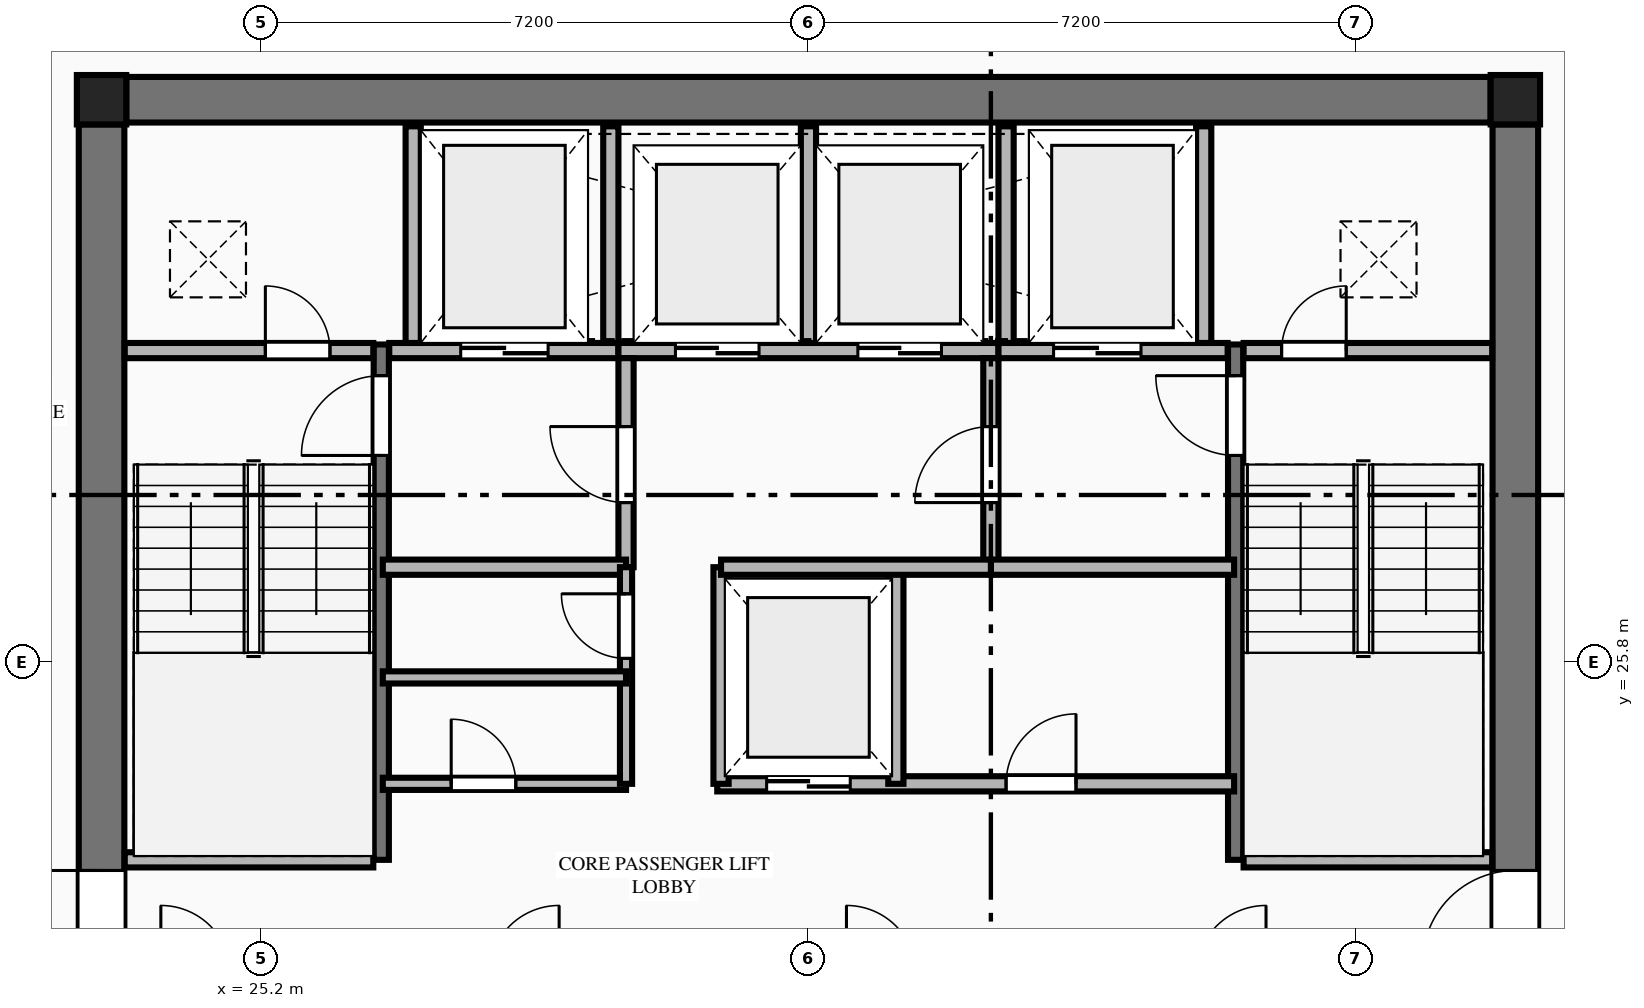
"""IFC4 building model, lengths in metres.
Left out: names, types, materials, properties, quantities, classifications, styles, units other than length and angle.
Written with IfcOpenShell. Run it as: python <this file> out.ifc"""

import sys

from ifc_helpers import new_model, si_unit, direction, frame, frame_2d, origin, origin_2d, place, context, subcontext, project, spatial, rectangle, extrude, element, fill, save


model = new_model("IFC4")
c1 = context("Model", 3, precision=1e-05, world=origin(), true_north=direction((0.0, 1.0)))
c2 = subcontext(c1, "Body", "Model", "MODEL_VIEW")
j1 = project(units=[si_unit("LENGTHUNIT", "METRE"), si_unit("PLANEANGLEUNIT", "RADIAN")], contexts=[c1])
p1 = place(None, origin())
s1 = spatial("IfcSite", under=j1, at=p1, CompositionType="ELEMENT")
p2 = place(p1, origin())
s2 = spatial("IfcBuilding", under=s1, at=p2, CompositionType="ELEMENT")
p3 = place(p2, frame((0.0, 0.0, 210.95)))
s3 = spatial("IfcBuildingStorey", under=s2, at=p3, CompositionType="ELEMENT", Elevation=210.95)
for number, where, z_axis, x_axis in (
    (1, (41.7, 33.2, 0.0), (0.0, 0.0, 1.0), (1.0, 0.0, 0.0)),
    (2, (23.1, 33.2, 0.0), (0.0, 0.0, 1.0), (1.0, 0.0, 0.0)),
):
    element("IfcColumn", number, at=place(p3, frame(where, z_axis=z_axis, x_axis=x_axis)), inside=s3, PredefinedType="COLUMN", context=c2, shape_type="SweptSolid", body=[
        extrude(rectangle(XDim=0.65, YDim=0.65, at=origin_2d()), origin(), (0.0, 0.0, 1.0), 3.55),
    ])
p4 = place(p3, frame((23.425, 33.2, 0.0), z_axis=(0.0, 0.0, 1.0), x_axis=(1.0, 0.0, 0.0)))
e3 = element("IfcWall", 3, at=p4, inside=s3, PredefinedType="SHEAR", context=c2, shape_type="SweptSolid", body=[
    extrude(rectangle(XDim=17.95, YDim=0.6, at=frame_2d((8.975, 0.0))), origin(), (0.0, 0.0, 1.0), 3.35),
])
p5 = place(p3, frame((23.1, 18.925, 0.0), z_axis=(0.0, 0.0, 1.0), x_axis=(0.0, 1.0, 0.0)))
e4 = element("IfcWall", 4, at=p5, inside=s3, PredefinedType="SHEAR", context=c2, shape_type="SweptSolid", body=[
    extrude(rectangle(XDim=13.95, YDim=0.6, at=frame_2d((6.975, 0.0))), origin(), (0.0, 0.0, 1.0), 3.35),
])
p6 = place(p5, frame((2.915, 0.0, 0.0)))
e5 = element("IfcOpeningElement", 5, at=p6, cuts=e4, PredefinedType="OPENING", context=c2, shape_type="SweptSolid", body=[
    extrude(rectangle(XDim=1.22, YDim=2.25, at=frame_2d((0.61, 1.125))), frame((0.0, 0.31, 0.0), z_axis=(0.0, -1.0, 0.0), x_axis=(1.0, 0.0, 0.0)), (0.0, 0.0, 1.0), 0.62),
])
p7 = place(p3, frame((41.7, 18.925, 0.0), z_axis=(0.0, 0.0, 1.0), x_axis=(0.0, 1.0, 0.0)))
e6 = element("IfcWall", 6, at=p7, inside=s3, PredefinedType="SHEAR", context=c2, shape_type="SweptSolid", body=[
    extrude(rectangle(XDim=13.95, YDim=0.6, at=frame_2d((6.975, 0.0))), origin(), (0.0, 0.0, 1.0), 3.35),
])
p8 = place(p7, frame((2.915, 0.0, 0.0)))
e7 = element("IfcOpeningElement", 7, at=p8, cuts=e6, PredefinedType="OPENING", context=c2, shape_type="SweptSolid", body=[
    extrude(rectangle(XDim=1.22, YDim=2.25, at=frame_2d((0.61, 1.125))), frame((0.0, 0.31, 0.0), z_axis=(0.0, -1.0, 0.0), x_axis=(1.0, 0.0, 0.0)), (0.0, 0.0, 1.0), 0.62),
])
p9 = place(p3, frame((26.78, 23.2, 0.0), z_axis=(0.0, 0.0, 1.0), x_axis=(0.0, 1.0, 0.0)))
e8 = element("IfcWall", 8, at=p9, inside=s3, PredefinedType="SHEAR", context=c2, shape_type="SweptSolid", body=[
    extrude(rectangle(XDim=6.78, YDim=0.2, at=frame_2d((3.39, 0.0))), origin(), (0.0, 0.0, 1.0), 3.55),
])
p10 = place(p9, frame((5.32, 0.0, 0.0)))
e9 = element("IfcOpeningElement", 9, at=p10, cuts=e8, PredefinedType="OPENING", context=c2, shape_type="SweptSolid", body=[
    extrude(rectangle(XDim=1.05, YDim=2.15, at=frame_2d((0.525, 1.075))), frame((0.0, 0.11, 0.0), z_axis=(0.0, -1.0, 0.0), x_axis=(1.0, 0.0, 0.0)), (0.0, 0.0, 1.0), 0.22),
])
p11 = place(p3, frame((23.405, 23.2, 0.0), z_axis=(0.0, 0.0, 1.0), x_axis=(1.0, 0.0, 0.0)))
e10 = element("IfcWall", 10, at=p11, inside=s3, PredefinedType="PLUMBINGWALL", context=c2, shape_type="SweptSolid", body=[
    extrude(rectangle(XDim=3.27, YDim=0.2, at=frame_2d((1.635, 0.0))), origin(), (0.0, 0.0, 1.0), 3.35),
])
p12 = place(p3, frame((38.02, 23.2, 0.0), z_axis=(0.0, 0.0, 1.0), x_axis=(0.0, 1.0, 0.0)))
e11 = element("IfcWall", 11, at=p12, inside=s3, PredefinedType="SHEAR", context=c2, shape_type="SweptSolid", body=[
    extrude(rectangle(XDim=6.78, YDim=0.2, at=frame_2d((3.39, 0.0))), origin(), (0.0, 0.0, 1.0), 3.55),
])
p13 = place(p12, frame((5.32, 0.0, 0.0)))
e12 = element("IfcOpeningElement", 12, at=p13, cuts=e11, PredefinedType="OPENING", context=c2, shape_type="SweptSolid", body=[
    extrude(rectangle(XDim=1.05, YDim=2.15, at=frame_2d((0.525, 1.075))), frame((0.0, 0.11, 0.0), z_axis=(0.0, -1.0, 0.0), x_axis=(1.0, 0.0, 0.0)), (0.0, 0.0, 1.0), 0.22),
])
p14 = place(p3, frame((38.125, 23.2, 0.0), z_axis=(0.0, 0.0, 1.0), x_axis=(1.0, 0.0, 0.0)))
e13 = element("IfcWall", 13, at=p14, inside=s3, PredefinedType="PLUMBINGWALL", context=c2, shape_type="SweptSolid", body=[
    extrude(rectangle(XDim=3.27, YDim=0.2, at=frame_2d((1.635, 0.0))), origin(), (0.0, 0.0, 1.0), 3.35),
])
p15 = place(p3, frame((23.405, 29.9, 0.0), z_axis=(0.0, 0.0, 1.0), x_axis=(1.0, 0.0, 0.0)))
e14 = element("IfcWall", 14, at=p15, inside=s3, PredefinedType="PLUMBINGWALL", context=c2, shape_type="SweptSolid", body=[
    extrude(rectangle(XDim=3.27, YDim=0.2, at=frame_2d((1.635, 0.0))), origin(), (0.0, 0.0, 1.0), 3.35),
])
p16 = place(p15, frame((1.85, 0.0, 0.0)))
e15 = element("IfcOpeningElement", 15, at=p16, cuts=e14, PredefinedType="OPENING", context=c2, shape_type="SweptSolid", body=[
    extrude(rectangle(XDim=0.85, YDim=2.05, at=frame_2d((0.425, 1.025))), frame((0.0, 0.11, 0.0), z_axis=(0.0, -1.0, 0.0), x_axis=(1.0, 0.0, 0.0)), (0.0, 0.0, 1.0), 0.22),
])
p17 = place(p3, frame((26.885, 29.9, 0.0), z_axis=(0.0, 0.0, 1.0), x_axis=(1.0, 0.0, 0.0)))
e16 = element("IfcWall", 16, at=p17, inside=s3, PredefinedType="PLUMBINGWALL", context=c2, shape_type="SweptSolid", body=[
    extrude(rectangle(XDim=3.015, YDim=0.2, at=frame_2d((1.507, 0.0))), origin(), (0.0, 0.0, 1.0), 3.35),
])
p18 = place(p17, frame((0.94, 0.0, 0.0)))
e17 = element("IfcOpeningElement", 17, at=p18, cuts=e16, PredefinedType="OPENING", context=c2, shape_type="SweptSolid", body=[
    extrude(rectangle(XDim=1.15, YDim=2.2, at=frame_2d((0.575, 1.1))), frame((0.0, 0.11, 0.0), z_axis=(0.0, -1.0, 0.0), x_axis=(1.0, 0.0, 0.0)), (0.0, 0.0, 1.0), 0.22),
])
p19 = place(p3, frame((29.9, 29.9, 0.0), z_axis=(0.0, 0.0, 1.0), x_axis=(1.0, 0.0, 0.0)))
e18 = element("IfcWall", 18, at=p19, inside=s3, PredefinedType="PLUMBINGWALL", context=c2, shape_type="SweptSolid", body=[
    extrude(rectangle(XDim=5.0, YDim=0.2, at=frame_2d((2.5, 0.0))), origin(), (0.0, 0.0, 1.0), 3.35),
])
p20 = place(p19, frame((0.75, 0.0, 0.0)))
e19 = element("IfcOpeningElement", 19, at=p20, cuts=e18, PredefinedType="OPENING", context=c2, shape_type="SweptSolid", body=[
    extrude(rectangle(XDim=1.1, YDim=2.2, at=frame_2d((0.55, 1.1))), frame((0.0, 0.11, 0.0), z_axis=(0.0, -1.0, 0.0), x_axis=(1.0, 0.0, 0.0)), (0.0, 0.0, 1.0), 0.22),
])
p21 = place(p19, frame((3.15, 0.0, 0.0)))
e20 = element("IfcOpeningElement", 20, at=p21, cuts=e18, PredefinedType="OPENING", context=c2, shape_type="SweptSolid", body=[
    extrude(rectangle(XDim=1.1, YDim=2.2, at=frame_2d((0.55, 1.1))), frame((0.0, 0.11, 0.0), z_axis=(0.0, -1.0, 0.0), x_axis=(1.0, 0.0, 0.0)), (0.0, 0.0, 1.0), 0.22),
])
p22 = place(p3, frame((34.9, 29.9, 0.0), z_axis=(0.0, 0.0, 1.0), x_axis=(1.0, 0.0, 0.0)))
e21 = element("IfcWall", 21, at=p22, inside=s3, PredefinedType="PLUMBINGWALL", context=c2, shape_type="SweptSolid", body=[
    extrude(rectangle(XDim=3.015, YDim=0.2, at=frame_2d((1.508, 0.0))), origin(), (0.0, 0.0, 1.0), 3.35),
])
p23 = place(p22, frame((0.725, 0.0, 0.0)))
e22 = element("IfcOpeningElement", 22, at=p23, cuts=e21, PredefinedType="OPENING", context=c2, shape_type="SweptSolid", body=[
    extrude(rectangle(XDim=1.15, YDim=2.2, at=frame_2d((0.575, 1.1))), frame((0.0, 0.11, 0.0), z_axis=(0.0, -1.0, 0.0), x_axis=(1.0, 0.0, 0.0)), (0.0, 0.0, 1.0), 0.22),
])
p24 = place(p3, frame((38.125, 29.9, 0.0), z_axis=(0.0, 0.0, 1.0), x_axis=(1.0, 0.0, 0.0)))
e23 = element("IfcWall", 23, at=p24, inside=s3, PredefinedType="PLUMBINGWALL", context=c2, shape_type="SweptSolid", body=[
    extrude(rectangle(XDim=3.27, YDim=0.2, at=frame_2d((1.635, 0.0))), origin(), (0.0, 0.0, 1.0), 3.35),
])
p25 = place(p24, frame((0.5, 0.0, 0.0)))
e24 = element("IfcOpeningElement", 24, at=p25, cuts=e23, PredefinedType="OPENING", context=c2, shape_type="SweptSolid", body=[
    extrude(rectangle(XDim=0.85, YDim=2.05, at=frame_2d((0.425, 1.025))), frame((0.0, 0.11, 0.0), z_axis=(0.0, -1.0, 0.0), x_axis=(1.0, 0.0, 0.0)), (0.0, 0.0, 1.0), 0.22),
])
for number, where, z_axis, x_axis in (
    (25, (27.2, 30.0, 0.0), (0.0, 0.0, 1.0), (0.0, 1.0, 0.0)),
    (26, (29.8, 30.0, 0.0), (0.0, 0.0, 1.0), (0.0, 1.0, 0.0)),
    (27, (32.4, 30.0, 0.0), (0.0, 0.0, 1.0), (0.0, 1.0, 0.0)),
    (28, (35.0, 30.0, 0.0), (0.0, 0.0, 1.0), (0.0, 1.0, 0.0)),
    (29, (37.6, 30.0, 0.0), (0.0, 0.0, 1.0), (0.0, 1.0, 0.0)),
):
    element("IfcWall", number, at=place(p3, frame(where, z_axis=z_axis, x_axis=x_axis)), inside=s3, PredefinedType="PLUMBINGWALL", context=c2, shape_type="SweptSolid", body=[
        extrude(rectangle(XDim=2.85, YDim=0.2, at=frame_2d((1.425, 0.0))), origin(), (0.0, 0.0, 1.0), 3.35),
    ])
p26 = place(p3, frame((30.0, 27.05, 0.0), z_axis=(0.0, 0.0, 1.0), x_axis=(0.0, 1.0, 0.0)))
e30 = element("IfcWall", 30, at=p26, inside=s3, PredefinedType="PLUMBINGWALL", context=c2, shape_type="SweptSolid", body=[
    extrude(rectangle(XDim=2.75, YDim=0.2, at=frame_2d((1.375, 0.0))), origin(), (0.0, 0.0, 1.0), 3.35),
])
p27 = place(p26, frame((0.85, 0.0, 0.0)))
e31 = element("IfcOpeningElement", 31, at=p27, cuts=e30, PredefinedType="OPENING", context=c2, shape_type="SweptSolid", body=[
    extrude(rectangle(XDim=1.0, YDim=2.15, at=frame_2d((0.5, 1.075))), frame((0.0, 0.11, 0.0), z_axis=(0.0, -1.0, 0.0), x_axis=(1.0, 0.0, 0.0)), (0.0, 0.0, 1.0), 0.22),
])
p28 = place(p3, frame((26.8, 27.05, 0.0), z_axis=(0.0, 0.0, 1.0), x_axis=(1.0, 0.0, 0.0)))
e32 = element("IfcWall", 32, at=p28, inside=s3, PredefinedType="PLUMBINGWALL", context=c2, shape_type="SweptSolid", body=[
    extrude(rectangle(XDim=3.2, YDim=0.2, at=frame_2d((1.6, 0.0))), origin(), (0.0, 0.0, 1.0), 3.35),
])
p29 = place(p3, frame((34.8, 27.05, 0.0), z_axis=(0.0, 0.0, 1.0), x_axis=(0.0, 1.0, 0.0)))
e33 = element("IfcWall", 33, at=p29, inside=s3, PredefinedType="PLUMBINGWALL", context=c2, shape_type="SweptSolid", body=[
    extrude(rectangle(XDim=2.75, YDim=0.2, at=frame_2d((1.375, 0.0))), origin(), (0.0, 0.0, 1.0), 3.35),
])
p30 = place(p29, frame((0.85, 0.0, 0.0)))
e34 = element("IfcOpeningElement", 34, at=p30, cuts=e33, PredefinedType="OPENING", context=c2, shape_type="SweptSolid", body=[
    extrude(rectangle(XDim=1.0, YDim=2.15, at=frame_2d((0.5, 1.075))), frame((0.0, 0.11, 0.0), z_axis=(0.0, -1.0, 0.0), x_axis=(1.0, 0.0, 0.0)), (0.0, 0.0, 1.0), 0.22),
])
p31 = place(p3, frame((34.8, 27.05, 0.0), z_axis=(0.0, 0.0, 1.0), x_axis=(1.0, 0.0, 0.0)))
e35 = element("IfcWall", 35, at=p31, inside=s3, PredefinedType="PLUMBINGWALL", context=c2, shape_type="SweptSolid", body=[
    extrude(rectangle(XDim=3.2, YDim=0.2, at=frame_2d((1.6, 0.0))), origin(), (0.0, 0.0, 1.0), 3.35),
])
p32 = place(p3, frame((26.8, 24.2, 0.0), z_axis=(0.0, 0.0, 1.0), x_axis=(1.0, 0.0, 0.0)))
e36 = element("IfcWall", 36, at=p32, inside=s3, PredefinedType="PARTITIONING", context=c2, shape_type="SweptSolid", body=[
    extrude(rectangle(XDim=3.2, YDim=0.16, at=frame_2d((1.6, 0.0))), origin(), (0.0, 0.0, 1.0), 3.35),
])
p33 = place(p32, frame((0.9, 0.0, 0.0)))
e37 = element("IfcOpeningElement", 37, at=p33, cuts=e36, PredefinedType="OPENING", context=c2, shape_type="SweptSolid", body=[
    extrude(rectangle(XDim=0.85, YDim=2.05, at=frame_2d((0.425, 1.025))), frame((0.0, 0.09, 0.0), z_axis=(0.0, -1.0, 0.0), x_axis=(1.0, 0.0, 0.0)), (0.0, 0.0, 1.0), 0.18),
])
p34 = place(p3, frame((30.0, 24.2, 0.0), z_axis=(0.0, 0.0, 1.0), x_axis=(0.0, 1.0, 0.0)))
e38 = element("IfcWall", 38, at=p34, inside=s3, PredefinedType="PARTITIONING", context=c2, shape_type="SweptSolid", body=[
    extrude(rectangle(XDim=2.85, YDim=0.16, at=frame_2d((1.425, 0.0))), origin(), (0.0, 0.0, 1.0), 3.35),
])
p35 = place(p34, frame((1.65, 0.0, 0.0)))
e39 = element("IfcOpeningElement", 39, at=p35, cuts=e38, PredefinedType="OPENING", context=c2, shape_type="SweptSolid", body=[
    extrude(rectangle(XDim=0.85, YDim=2.05, at=frame_2d((0.425, 1.025))), frame((0.0, 0.09, 0.0), z_axis=(0.0, -1.0, 0.0), x_axis=(1.0, 0.0, 0.0)), (0.0, 0.0, 1.0), 0.18),
])
p36 = place(p3, frame((31.2, 24.2, 0.0), z_axis=(0.0, 0.0, 1.0), x_axis=(1.0, 0.0, 0.0)))
e40 = element("IfcWall", 40, at=p36, inside=s3, PredefinedType="PLUMBINGWALL", context=c2, shape_type="SweptSolid", body=[
    extrude(rectangle(XDim=6.8, YDim=0.2, at=frame_2d((3.4, 0.0))), origin(), (0.0, 0.0, 1.0), 3.35),
])
p37 = place(p36, frame((0.65, 0.0, 0.0)))
e41 = element("IfcOpeningElement", 41, at=p37, cuts=e40, PredefinedType="OPENING", context=c2, shape_type="SweptSolid", body=[
    extrude(rectangle(XDim=1.1, YDim=2.2, at=frame_2d((0.55, 1.1))), frame((0.0, 0.11, 0.0), z_axis=(0.0, -1.0, 0.0), x_axis=(1.0, 0.0, 0.0)), (0.0, 0.0, 1.0), 0.22),
])
p38 = place(p36, frame((3.8, 0.0, 0.0)))
e42 = element("IfcOpeningElement", 42, at=p38, cuts=e40, PredefinedType="OPENING", context=c2, shape_type="SweptSolid", body=[
    extrude(rectangle(XDim=0.92, YDim=2.15, at=frame_2d((0.46, 1.075))), frame((0.0, 0.11, 0.0), z_axis=(0.0, -1.0, 0.0), x_axis=(1.0, 0.0, 0.0)), (0.0, 0.0, 1.0), 0.22),
])
for number, where, z_axis, x_axis in (
    (43, (31.25, 24.2, 0.0), (0.0, 0.0, 1.0), (0.0, 1.0, 0.0)),
    (44, (33.55, 24.2, 0.0), (0.0, 0.0, 1.0), (0.0, 1.0, 0.0)),
):
    element("IfcWall", number, at=place(p3, frame(where, z_axis=z_axis, x_axis=x_axis)), inside=s3, PredefinedType="PLUMBINGWALL", context=c2, shape_type="SweptSolid", body=[
        extrude(rectangle(XDim=2.85, YDim=0.2, at=frame_2d((1.425, 0.0))), origin(), (0.0, 0.0, 1.0), 3.35),
    ])
p39 = place(p3, frame((31.25, 27.05, 0.0), z_axis=(0.0, 0.0, 1.0), x_axis=(1.0, 0.0, 0.0)))
e45 = element("IfcWall", 45, at=p39, inside=s3, PredefinedType="PLUMBINGWALL", context=c2, shape_type="SweptSolid", body=[
    extrude(rectangle(XDim=3.55, YDim=0.2, at=frame_2d((1.775, 0.0))), origin(), (0.0, 0.0, 1.0), 3.35),
])
p40 = place(p3, frame((26.8, 25.6, 0.0), z_axis=(0.0, 0.0, 1.0), x_axis=(1.0, 0.0, 0.0)))
e46 = element("IfcWall", 46, at=p40, inside=s3, PredefinedType="PARTITIONING", context=c2, shape_type="SweptSolid", body=[
    extrude(rectangle(XDim=3.2, YDim=0.16, at=frame_2d((1.6, 0.0))), origin(), (0.0, 0.0, 1.0), 3.35),
])
p41 = place(p6, origin())
e47 = element("IfcDoor", 47, at=p41, inside=s3, OperationType="SINGLE_SWING_RIGHT", PredefinedType="DOOR", context=c2, shape_type="SweptSolid", body=[
    extrude(rectangle(XDim=1.22, YDim=2.25, at=frame_2d((0.61, 1.125))), frame((0.0, 0.025, 0.0), z_axis=(0.0, -1.0, 0.0), x_axis=(1.0, 0.0, 0.0)), (0.0, 0.0, 1.0), 0.05),
])
fill(e5, e47)
p42 = place(p8, origin())
e48 = element("IfcDoor", 48, at=p42, inside=s3, OperationType="SINGLE_SWING_LEFT", PredefinedType="DOOR", context=c2, shape_type="SweptSolid", body=[
    extrude(rectangle(XDim=1.22, YDim=2.25, at=frame_2d((0.61, 1.125))), frame((0.0, 0.025, 0.0), z_axis=(0.0, -1.0, 0.0), x_axis=(1.0, 0.0, 0.0)), (0.0, 0.0, 1.0), 0.05),
])
fill(e7, e48)
p43 = place(p10, origin())
e49 = element("IfcDoor", 49, at=p43, inside=s3, OperationType="SINGLE_SWING_LEFT", PredefinedType="DOOR", context=c2, shape_type="SweptSolid", body=[
    extrude(rectangle(XDim=1.05, YDim=2.15, at=frame_2d((0.525, 1.075))), frame((0.0, 0.025, 0.0), z_axis=(0.0, -1.0, 0.0), x_axis=(1.0, 0.0, 0.0)), (0.0, 0.0, 1.0), 0.05),
])
fill(e9, e49)
p44 = place(p13, origin())
e50 = element("IfcDoor", 50, at=p44, inside=s3, OperationType="SINGLE_SWING_RIGHT", PredefinedType="DOOR", context=c2, shape_type="SweptSolid", body=[
    extrude(rectangle(XDim=1.05, YDim=2.15, at=frame_2d((0.525, 1.075))), frame((0.0, 0.025, 0.0), z_axis=(0.0, -1.0, 0.0), x_axis=(1.0, 0.0, 0.0)), (0.0, 0.0, 1.0), 0.05),
])
fill(e12, e50)
p45 = place(p16, origin())
e51 = element("IfcDoor", 51, at=p45, inside=s3, OperationType="SINGLE_SWING_LEFT", PredefinedType="DOOR", context=c2, shape_type="SweptSolid", body=[
    extrude(rectangle(XDim=0.85, YDim=2.05, at=frame_2d((0.425, 1.025))), frame((0.0, 0.025, 0.0), z_axis=(0.0, -1.0, 0.0), x_axis=(1.0, 0.0, 0.0)), (0.0, 0.0, 1.0), 0.05),
])
fill(e15, e51)
p46 = place(p25, origin())
e52 = element("IfcDoor", 52, at=p46, inside=s3, OperationType="SINGLE_SWING_RIGHT", PredefinedType="DOOR", context=c2, shape_type="SweptSolid", body=[
    extrude(rectangle(XDim=0.85, YDim=2.05, at=frame_2d((0.425, 1.025))), frame((0.0, 0.025, 0.0), z_axis=(0.0, -1.0, 0.0), x_axis=(1.0, 0.0, 0.0)), (0.0, 0.0, 1.0), 0.05),
])
fill(e24, e52)
p47 = place(p18, origin())
e53 = element("IfcDoor", 53, at=p47, inside=s3, OperationType="DOUBLE_DOOR_SLIDING", PredefinedType="DOOR", context=c2, shape_type="SweptSolid", body=[
    extrude(rectangle(XDim=1.15, YDim=2.2, at=frame_2d((0.575, 1.1))), frame((0.0, 0.025, 0.0), z_axis=(0.0, -1.0, 0.0), x_axis=(1.0, 0.0, 0.0)), (0.0, 0.0, 1.0), 0.05),
])
fill(e17, e53)
p48 = place(p23, origin())
e54 = element("IfcDoor", 54, at=p48, inside=s3, OperationType="DOUBLE_DOOR_SLIDING", PredefinedType="DOOR", context=c2, shape_type="SweptSolid", body=[
    extrude(rectangle(XDim=1.15, YDim=2.2, at=frame_2d((0.575, 1.1))), frame((0.0, 0.025, 0.0), z_axis=(0.0, -1.0, 0.0), x_axis=(1.0, 0.0, 0.0)), (0.0, 0.0, 1.0), 0.05),
])
fill(e22, e54)
p49 = place(p20, origin())
e55 = element("IfcDoor", 55, at=p49, inside=s3, OperationType="DOUBLE_DOOR_SLIDING", PredefinedType="DOOR", context=c2, shape_type="SweptSolid", body=[
    extrude(rectangle(XDim=1.1, YDim=2.2, at=frame_2d((0.55, 1.1))), frame((0.0, 0.025, 0.0), z_axis=(0.0, -1.0, 0.0), x_axis=(1.0, 0.0, 0.0)), (0.0, 0.0, 1.0), 0.05),
])
fill(e19, e55)
p50 = place(p21, origin())
e56 = element("IfcDoor", 56, at=p50, inside=s3, OperationType="DOUBLE_DOOR_SLIDING", PredefinedType="DOOR", context=c2, shape_type="SweptSolid", body=[
    extrude(rectangle(XDim=1.1, YDim=2.2, at=frame_2d((0.55, 1.1))), frame((0.0, 0.025, 0.0), z_axis=(0.0, -1.0, 0.0), x_axis=(1.0, 0.0, 0.0)), (0.0, 0.0, 1.0), 0.05),
])
fill(e20, e56)
p51 = place(p27, origin())
e57 = element("IfcDoor", 57, at=p51, inside=s3, OperationType="SINGLE_SWING_RIGHT", PredefinedType="DOOR", context=c2, shape_type="SweptSolid", body=[
    extrude(rectangle(XDim=1.0, YDim=2.15, at=frame_2d((0.5, 1.075))), frame((0.0, 0.025, 0.0), z_axis=(0.0, -1.0, 0.0), x_axis=(1.0, 0.0, 0.0)), (0.0, 0.0, 1.0), 0.05),
])
fill(e31, e57)
p52 = place(p30, origin())
e58 = element("IfcDoor", 58, at=p52, inside=s3, OperationType="SINGLE_SWING_LEFT", PredefinedType="DOOR", context=c2, shape_type="SweptSolid", body=[
    extrude(rectangle(XDim=1.0, YDim=2.15, at=frame_2d((0.5, 1.075))), frame((0.0, 0.025, 0.0), z_axis=(0.0, -1.0, 0.0), x_axis=(1.0, 0.0, 0.0)), (0.0, 0.0, 1.0), 0.05),
])
fill(e34, e58)
p53 = place(p37, origin())
e59 = element("IfcDoor", 59, at=p53, inside=s3, OperationType="DOUBLE_DOOR_SLIDING", PredefinedType="DOOR", context=c2, shape_type="SweptSolid", body=[
    extrude(rectangle(XDim=1.1, YDim=2.2, at=frame_2d((0.55, 1.1))), frame((0.0, 0.025, 0.0), z_axis=(0.0, -1.0, 0.0), x_axis=(1.0, 0.0, 0.0)), (0.0, 0.0, 1.0), 0.05),
])
fill(e41, e59)
p54 = place(p33, origin())
e60 = element("IfcDoor", 60, at=p54, inside=s3, OperationType="SINGLE_SWING_LEFT", PredefinedType="DOOR", context=c2, shape_type="SweptSolid", body=[
    extrude(rectangle(XDim=0.85, YDim=2.05, at=frame_2d((0.425, 1.025))), frame((0.0, 0.025, 0.0), z_axis=(0.0, -1.0, 0.0), x_axis=(1.0, 0.0, 0.0)), (0.0, 0.0, 1.0), 0.05),
])
fill(e37, e60)
p55 = place(p35, origin())
e61 = element("IfcDoor", 61, at=p55, inside=s3, OperationType="SINGLE_SWING_RIGHT", PredefinedType="DOOR", context=c2, shape_type="SweptSolid", body=[
    extrude(rectangle(XDim=0.85, YDim=2.05, at=frame_2d((0.425, 1.025))), frame((0.0, 0.025, 0.0), z_axis=(0.0, -1.0, 0.0), x_axis=(1.0, 0.0, 0.0)), (0.0, 0.0, 1.0), 0.05),
])
fill(e39, e61)
p56 = place(p38, origin())
e62 = element("IfcDoor", 62, at=p56, inside=s3, OperationType="SINGLE_SWING_RIGHT", PredefinedType="DOOR", context=c2, shape_type="SweptSolid", body=[
    extrude(rectangle(XDim=0.92, YDim=2.15, at=frame_2d((0.46, 1.075))), frame((0.0, 0.025, 0.0), z_axis=(0.0, -1.0, 0.0), x_axis=(1.0, 0.0, 0.0)), (0.0, 0.0, 1.0), 0.05),
])
fill(e42, e62)
save(model, sys.argv[1])
